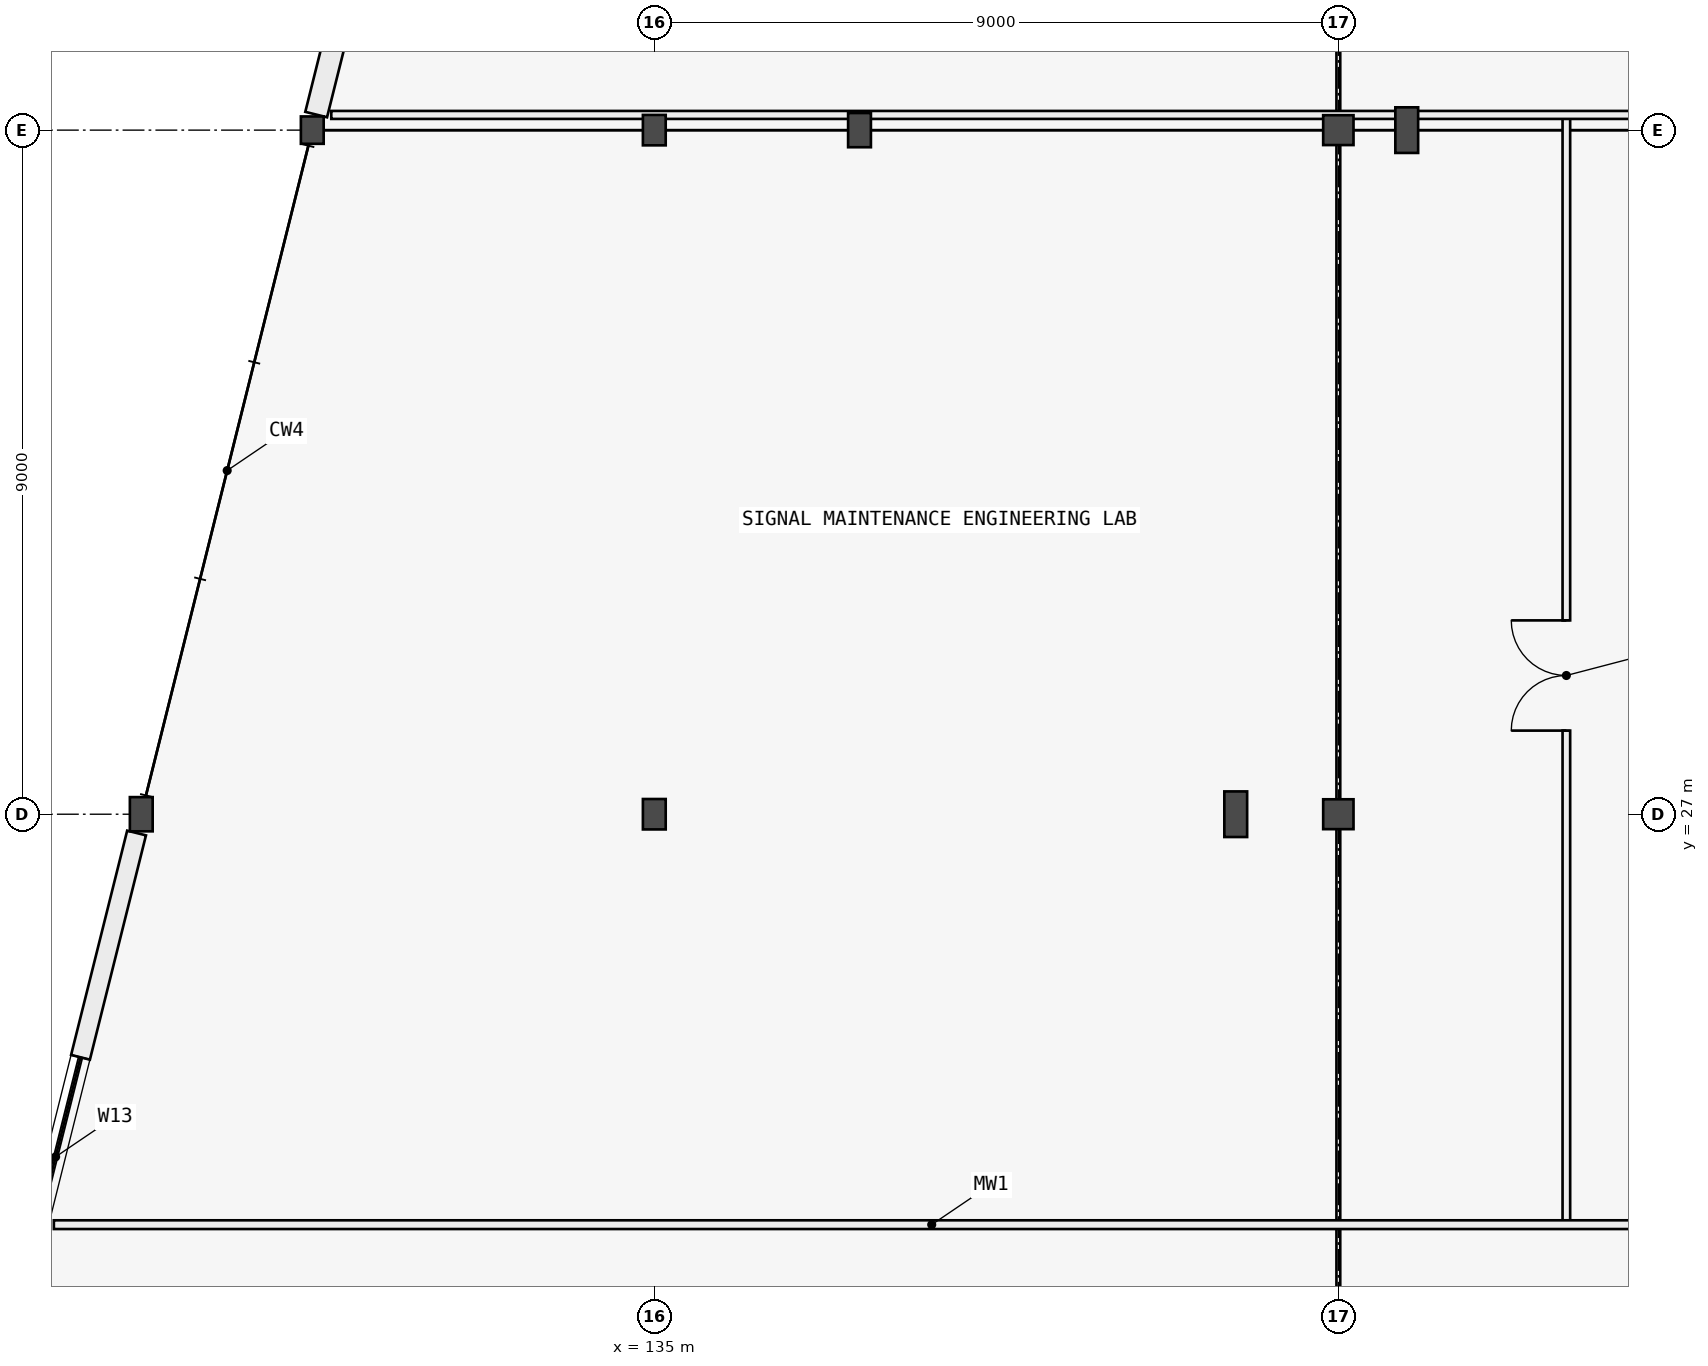
"""IFC4 building model, lengths in metres.
Left out: names, types, materials, properties, quantities, classifications, styles, units other than length and angle.
Written with IfcOpenShell. Run it as: python <this file> out.ifc"""

import sys

from ifc_helpers import new_model, si_unit, direction, frame, frame_2d, origin, origin_2d, place, context, subcontext, project, spatial, rectangle, i_section, extrude, element, fill, save


model = new_model("IFC4")
c1 = context("Model", 3, precision=1e-05, world=origin(), true_north=direction((0.0, 1.0)))
c2 = subcontext(c1, "Body", "Model", "MODEL_VIEW")
j1 = project(units=[si_unit("LENGTHUNIT", "METRE"), si_unit("PLANEANGLEUNIT", "RADIAN")], contexts=[c1])
p1 = place(None, origin())
s1 = spatial("IfcSite", under=j1, at=p1, CompositionType="ELEMENT")
p2 = place(p1, origin())
s2 = spatial("IfcBuilding", under=s1, at=p2, CompositionType="ELEMENT")
p3 = place(p2, frame((0.0, 0.0, 12.6)))
s3 = spatial("IfcBuildingStorey", under=s2, at=p3, CompositionType="ELEMENT", Elevation=12.6)
p4 = place(p3, frame((128.25, 27.0, 0.0), z_axis=(0.0, 0.0, 1.0), x_axis=(1.0, 0.0, 0.0)))
e1 = element("IfcColumn", 1, at=p4, inside=s3, PredefinedType="COLUMN", context=c2, shape_type="SweptSolid", body=[
    extrude(i_section(OverallWidth=0.3, OverallDepth=0.45, WebThickness=0.014, FlangeThickness=0.026, FilletRadius=0.027, at=origin_2d()), origin(), (0.0, 0.0, 1.0), 4.2),
])
p5 = place(p3, frame((135.0, 27.0, 0.0), z_axis=(0.0, 0.0, 1.0), x_axis=(1.0, 0.0, 0.0)))
e2 = element("IfcColumn", 2, at=p5, inside=s3, PredefinedType="COLUMN", context=c2, shape_type="SweptSolid", body=[
    extrude(i_section(OverallWidth=0.3, OverallDepth=0.4, WebThickness=0.013, FlangeThickness=0.024, FilletRadius=0.027, at=origin_2d()), origin(), (0.0, 0.0, 1.0), 4.2),
])
p6 = place(p3, frame((142.65, 27.0, 0.0), z_axis=(0.0, 0.0, 1.0), x_axis=(1.0, 0.0, 0.0)))
e3 = element("IfcColumn", 3, at=p6, inside=s3, PredefinedType="COLUMN", context=c2, shape_type="SweptSolid", body=[
    extrude(i_section(OverallWidth=0.3, OverallDepth=0.6, WebThickness=0.015, FlangeThickness=0.03, FilletRadius=0.027, at=origin_2d()), origin(), (0.0, 0.0, 1.0), 4.2),
])
p7 = place(p3, frame((144.0, 27.0, 0.0), z_axis=(0.0, 0.0, 1.0), x_axis=(1.0, 0.0, 0.0)))
e4 = element("IfcColumn", 4, at=p7, inside=s3, PredefinedType="COLUMN", context=c2, shape_type="SweptSolid", body=[
    extrude(i_section(OverallWidth=0.399, OverallDepth=0.393, WebThickness=0.018, FlangeThickness=0.028, FilletRadius=0.015, at=origin_2d()), origin(), (0.0, 0.0, 1.0), 4.2),
])
p8 = place(p3, frame((130.5, 36.0, 0.0), z_axis=(0.0, 0.0, 1.0), x_axis=(1.0, 0.0, 0.0)))
e5 = element("IfcColumn", 5, at=p8, inside=s3, PredefinedType="COLUMN", context=c2, shape_type="SweptSolid", body=[
    extrude(i_section(OverallWidth=0.3, OverallDepth=0.36, WebThickness=0.012, FlangeThickness=0.022, FilletRadius=0.027, at=origin_2d()), origin(), (0.0, 0.0, 1.0), 4.2),
])
p9 = place(p3, frame((135.0, 36.0, 0.0), z_axis=(0.0, 0.0, 1.0), x_axis=(1.0, 0.0, 0.0)))
e6 = element("IfcColumn", 6, at=p9, inside=s3, PredefinedType="COLUMN", context=c2, shape_type="SweptSolid", body=[
    extrude(i_section(OverallWidth=0.3, OverallDepth=0.4, WebThickness=0.013, FlangeThickness=0.024, FilletRadius=0.027, at=origin_2d()), origin(), (0.0, 0.0, 1.0), 4.2),
])
p10 = place(p3, frame((137.7, 36.0, 0.0), z_axis=(0.0, 0.0, 1.0), x_axis=(1.0, 0.0, 0.0)))
e7 = element("IfcColumn", 7, at=p10, inside=s3, PredefinedType="COLUMN", context=c2, shape_type="SweptSolid", body=[
    extrude(i_section(OverallWidth=0.3, OverallDepth=0.45, WebThickness=0.014, FlangeThickness=0.026, FilletRadius=0.027, at=origin_2d()), origin(), (0.0, 0.0, 1.0), 4.2),
])
p11 = place(p3, frame((144.0, 36.0, 0.0), z_axis=(0.0, 0.0, 1.0), x_axis=(1.0, 0.0, 0.0)))
e8 = element("IfcColumn", 8, at=p11, inside=s3, PredefinedType="COLUMN", context=c2, shape_type="SweptSolid", body=[
    extrude(i_section(OverallWidth=0.399, OverallDepth=0.393, WebThickness=0.018, FlangeThickness=0.028, FilletRadius=0.015, at=origin_2d()), origin(), (0.0, 0.0, 1.0), 4.2),
])
p12 = place(p3, frame((144.9, 36.0, 0.0), z_axis=(0.0, 0.0, 1.0), x_axis=(1.0, 0.0, 0.0)))
e9 = element("IfcColumn", 9, at=p12, inside=s3, PredefinedType="COLUMN", context=c2, shape_type="SweptSolid", body=[
    extrude(i_section(OverallWidth=0.3, OverallDepth=0.6, WebThickness=0.015, FlangeThickness=0.03, FilletRadius=0.027, at=origin_2d()), origin(), (0.0, 0.0, 1.0), 4.2),
])
p13 = place(p3, frame((126.058, 18.232, 0.0), z_axis=(0.0, 0.0, 1.0), x_axis=(0.242522544412, 0.970145770208, 0.0)))
e10 = element("IfcWall", 10, at=p13, inside=s3, PredefinedType="POLYGONAL", context=c2, shape_type="SweptSolid", body=[
    extrude(rectangle(XDim=8.783, YDim=0.255, at=frame_2d((4.392, 0.0))), origin(), (0.0, 0.0, 1.0), 3.45),
])
p14 = place(p13, frame((3.042, 0.0, 0.95)))
e11 = element("IfcOpeningElement", 11, at=p14, cuts=e10, PredefinedType="OPENING", context=c2, shape_type="SweptSolid", body=[
    extrude(rectangle(XDim=2.7, YDim=1.6, at=frame_2d((1.35, 0.8))), frame((0.0, 0.137, 0.0), z_axis=(0.0, -1.0, 0.0), x_axis=(1.0, 0.0, 0.0)), (0.0, 0.0, 1.0), 0.275),
])
p15 = place(p3, frame((130.551, 36.205, 0.0), z_axis=(0.0, 0.0, 1.0), x_axis=(0.242509676291, 0.970148986963, 0.0)))
e12 = element("IfcWall", 12, at=p15, inside=s3, PredefinedType="STANDARD", context=c2, shape_type="SweptSolid", body=[
    extrude(rectangle(XDim=8.855, YDim=0.295, at=frame_2d((4.428, 0.0))), origin(), (0.0, 0.0, 1.0), 3.925),
])
p16 = place(p15, frame((2.927, 0.0, 0.95)))
e13 = element("IfcOpeningElement", 13, at=p16, cuts=e12, PredefinedType="OPENING", context=c2, shape_type="SweptSolid", body=[
    extrude(rectangle(XDim=3.0, YDim=1.8, at=frame_2d((1.5, 0.9))), frame((0.0, 0.157, 0.0), z_axis=(0.0, -1.0, 0.0), x_axis=(1.0, 0.0, 0.0)), (0.0, 0.0, 1.0), 0.315),
])
p17 = place(p3, frame((147.0, 21.6, 0.0), z_axis=(0.0, 0.0, 1.0), x_axis=(0.0, 1.0, 0.0)))
e14 = element("IfcWall", 14, at=p17, inside=s3, PredefinedType="PARTITIONING", context=c2, shape_type="SweptSolid", body=[
    extrude(rectangle(XDim=14.6, YDim=0.1, at=frame_2d((7.3, 0.0))), origin(), (0.0, 0.0, 1.0), 3.925),
])
p18 = place(p17, frame((6.5, 0.0, 0.0)))
e15 = element("IfcOpeningElement", 15, at=p18, cuts=e14, PredefinedType="OPENING", context=c2, shape_type="SweptSolid", body=[
    extrude(rectangle(XDim=1.45, YDim=2.22, at=frame_2d((0.725, 1.11))), frame((0.0, 0.06, 0.0), z_axis=(0.0, -1.0, 0.0), x_axis=(1.0, 0.0, 0.0)), (0.0, 0.0, 1.0), 0.12),
])
p19 = place(p3, frame((127.1, 21.6, 0.0), z_axis=(0.0, 0.0, 1.0), x_axis=(1.0, 0.0, 0.0)))
e16 = element("IfcWall", 16, at=p19, inside=s3, PredefinedType="MOVABLE", context=c2, shape_type="SweptSolid", body=[
    extrude(rectangle(XDim=23.1, YDim=0.115, at=frame_2d((11.55, 0.0))), origin(), (0.0, 0.0, 1.0), 3.925),
])
p20 = place(p3, frame((130.75, 36.2, 0.0), z_axis=(0.0, 0.0, 1.0), x_axis=(1.0, 0.0, 0.0)))
e17 = element("IfcWall", 17, at=p20, inside=s3, PredefinedType="MOVABLE", context=c2, shape_type="SweptSolid", body=[
    extrude(rectangle(XDim=27.85, YDim=0.105, at=frame_2d((13.925, 0.0))), origin(), (0.0, 0.0, 1.0), 3.4),
])
p21 = place(p14, origin())
e18 = element("IfcWindow", 18, at=p21, inside=s3, PartitioningType="SINGLE_PANEL", PredefinedType="WINDOW", context=c2, shape_type="SweptSolid", body=[
    extrude(rectangle(XDim=2.7, YDim=1.6, at=frame_2d((1.35, 0.8))), frame((0.0, 0.03, 0.0), z_axis=(0.0, -1.0, 0.0), x_axis=(1.0, 0.0, 0.0)), (0.0, 0.0, 1.0), 0.06),
])
fill(e11, e18)
p22 = place(p18, origin())
e19 = element("IfcDoor", 19, at=p22, inside=s3, OperationType="DOUBLE_DOOR_SINGLE_SWING", PredefinedType="DOOR", context=c2, shape_type="SweptSolid", body=[
    extrude(rectangle(XDim=1.45, YDim=2.22, at=frame_2d((0.725, 1.11))), frame((0.0, 0.025, 0.0), z_axis=(0.0, -1.0, 0.0), x_axis=(1.0, 0.0, 0.0)), (0.0, 0.0, 1.0), 0.05),
])
fill(e15, e19)
save(model, sys.argv[1])
